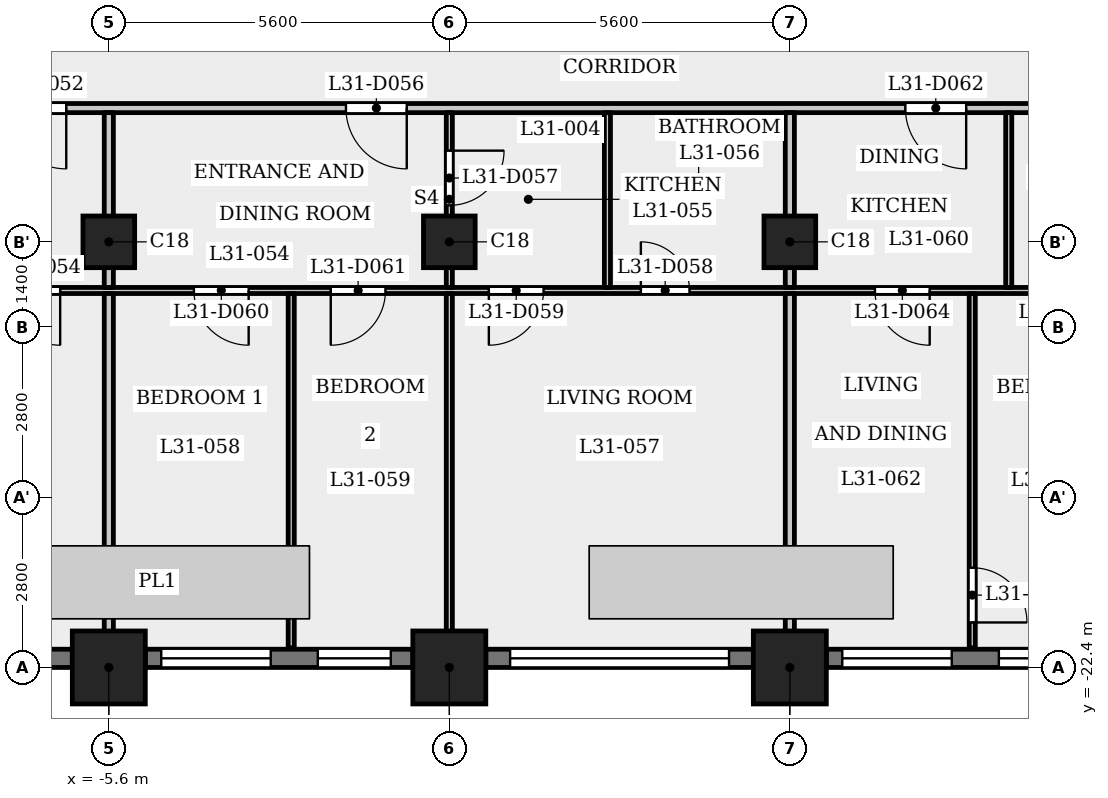
"""IFC4 building model, lengths in metres.
Left out: names, types, materials, properties, quantities, classifications, styles, units other than length and angle.
Written with IfcOpenShell. Run it as: python <this file> out.ifc"""

import sys

from ifc_helpers import new_model, si_unit, direction, frame, frame_2d, origin, origin_2d, place, context, subcontext, project, spatial, rectangle, extrude, element, fill, save


model = new_model("IFC4")
c1 = context("Model", 3, precision=1e-05, world=origin(), true_north=direction((0.0, 1.0)))
c2 = subcontext(c1, "Body", "Model", "MODEL_VIEW")
j1 = project(units=[si_unit("LENGTHUNIT", "METRE"), si_unit("PLANEANGLEUNIT", "RADIAN")], contexts=[c1])
p1 = place(None, origin())
s1 = spatial("IfcSite", under=j1, at=p1, CompositionType="ELEMENT")
p2 = place(p1, origin())
s2 = spatial("IfcBuilding", under=s1, at=p2, CompositionType="ELEMENT")
p3 = place(p2, frame((0.0, 0.0, 121.8)))
s3 = spatial("IfcBuildingStorey", under=s2, at=p3, CompositionType="ELEMENT", Elevation=121.8)
for number, where, z_axis, x_axis in (
    (1, (-5.6, -22.4, 0.0), (0.0, 0.0, 1.0), (1.0, 0.0, 0.0)),
    (2, (0.0, -22.4, 0.0), (0.0, 0.0, 1.0), (1.0, 0.0, 0.0)),
    (3, (5.6, -22.4, 0.0), (0.0, 0.0, 1.0), (1.0, 0.0, 0.0)),
):
    element("IfcColumn", number, at=place(p3, frame(where, z_axis=z_axis, x_axis=x_axis)), inside=s3, PredefinedType="COLUMN", context=c2, shape_type="SweptSolid", body=[
        extrude(rectangle(XDim=1.2, YDim=1.2, at=origin_2d()), origin(), (0.0, 0.0, 1.0), 3.5),
    ])
for number, where, z_axis, x_axis in (
    (4, (-5.6, -15.4, 0.0), (0.0, 0.0, 1.0), (1.0, 0.0, 0.0)),
    (5, (0.0, -15.4, 0.0), (0.0, 0.0, 1.0), (1.0, 0.0, 0.0)),
    (6, (5.6, -15.4, 0.0), (0.0, 0.0, 1.0), (1.0, 0.0, 0.0)),
):
    element("IfcColumn", number, at=place(p3, frame(where, z_axis=z_axis, x_axis=x_axis)), inside=s3, PredefinedType="COLUMN", context=c2, shape_type="SweptSolid", body=[
        extrude(rectangle(XDim=0.85, YDim=0.85, at=origin_2d()), origin(), (0.0, 0.0, 1.0), 3.5),
    ])
p4 = place(p3, frame((-10.6, -22.25, 0.0), z_axis=(0.0, 0.0, 1.0), x_axis=(1.0, 0.0, 0.0)))
e7 = element("IfcWall", 7, at=p4, inside=s3, PredefinedType="SOLIDWALL", context=c2, shape_type="SweptSolid", body=[
    extrude(rectangle(XDim=4.4, YDim=0.3, at=frame_2d((2.2, 0.0))), origin(), (0.0, 0.0, 1.0), 2.35),
])
p5 = place(p4, frame((0.4, 0.0, 1.2)))
e8 = element("IfcOpeningElement", 8, at=p5, cuts=e7, PredefinedType="OPENING", context=c2, shape_type="SweptSolid", body=[
    extrude(rectangle(XDim=3.6, YDim=0.95, at=frame_2d((1.8, 0.475))), frame((0.0, 0.16, 0.0), z_axis=(0.0, -1.0, 0.0), x_axis=(1.0, 0.0, 0.0)), (0.0, 0.0, 1.0), 0.32),
])
p6 = place(p3, frame((-5.0, -22.25, 0.0), z_axis=(0.0, 0.0, 1.0), x_axis=(1.0, 0.0, 0.0)))
e9 = element("IfcWall", 9, at=p6, inside=s3, PredefinedType="SOLIDWALL", context=c2, shape_type="SweptSolid", body=[
    extrude(rectangle(XDim=4.4, YDim=0.3, at=frame_2d((2.2, 0.0))), origin(), (0.0, 0.0, 1.0), 2.35),
])
p7 = place(p6, frame((0.262, 0.0, 0.9)))
e10 = element("IfcOpeningElement", 10, at=p7, cuts=e9, PredefinedType="OPENING", context=c2, shape_type="SweptSolid", body=[
    extrude(rectangle(XDim=1.8, YDim=1.25, at=frame_2d((0.9, 0.625))), frame((0.0, 0.16, 0.0), z_axis=(0.0, -1.0, 0.0), x_axis=(1.0, 0.0, 0.0)), (0.0, 0.0, 1.0), 0.32),
])
p8 = place(p6, frame((2.837, 0.0, 0.6)))
e11 = element("IfcOpeningElement", 11, at=p8, cuts=e9, PredefinedType="OPENING", context=c2, shape_type="SweptSolid", body=[
    extrude(rectangle(XDim=1.2, YDim=1.55, at=frame_2d((0.6, 0.775))), frame((0.0, 0.16, 0.0), z_axis=(0.0, -1.0, 0.0), x_axis=(1.0, 0.0, 0.0)), (0.0, 0.0, 1.0), 0.32),
])
p9 = place(p3, frame((0.6, -22.25, 0.0), z_axis=(0.0, 0.0, 1.0), x_axis=(1.0, 0.0, 0.0)))
e12 = element("IfcWall", 12, at=p9, inside=s3, PredefinedType="SOLIDWALL", context=c2, shape_type="SweptSolid", body=[
    extrude(rectangle(XDim=4.4, YDim=0.3, at=frame_2d((2.2, 0.0))), origin(), (0.0, 0.0, 1.0), 2.35),
])
p10 = place(p9, frame((0.4, 0.0, 1.2)))
e13 = element("IfcOpeningElement", 13, at=p10, cuts=e12, PredefinedType="OPENING", context=c2, shape_type="SweptSolid", body=[
    extrude(rectangle(XDim=3.6, YDim=0.95, at=frame_2d((1.8, 0.475))), frame((0.0, 0.16, 0.0), z_axis=(0.0, -1.0, 0.0), x_axis=(1.0, 0.0, 0.0)), (0.0, 0.0, 1.0), 0.32),
])
p11 = place(p3, frame((6.2, -22.25, 0.0), z_axis=(0.0, 0.0, 1.0), x_axis=(1.0, 0.0, 0.0)))
e14 = element("IfcWall", 14, at=p11, inside=s3, PredefinedType="SOLIDWALL", context=c2, shape_type="SweptSolid", body=[
    extrude(rectangle(XDim=4.4, YDim=0.3, at=frame_2d((2.2, 0.0))), origin(), (0.0, 0.0, 1.0), 2.35),
])
p12 = place(p11, frame((0.262, 0.0, 0.9)))
e15 = element("IfcOpeningElement", 15, at=p12, cuts=e14, PredefinedType="OPENING", context=c2, shape_type="SweptSolid", body=[
    extrude(rectangle(XDim=1.8, YDim=1.25, at=frame_2d((0.9, 0.625))), frame((0.0, 0.16, 0.0), z_axis=(0.0, -1.0, 0.0), x_axis=(1.0, 0.0, 0.0)), (0.0, 0.0, 1.0), 0.32),
])
p13 = place(p11, frame((2.837, 0.0, 0.6)))
e16 = element("IfcOpeningElement", 16, at=p13, cuts=e14, PredefinedType="OPENING", context=c2, shape_type="SweptSolid", body=[
    extrude(rectangle(XDim=1.2, YDim=1.55, at=frame_2d((0.6, 0.775))), frame((0.0, 0.16, 0.0), z_axis=(0.0, -1.0, 0.0), x_axis=(1.0, 0.0, 0.0)), (0.0, 0.0, 1.0), 0.32),
])
p14 = place(p3, frame((-16.725, -16.2, 0.0), z_axis=(0.0, 0.0, 1.0), x_axis=(1.0, 0.0, 0.0)))
e17 = element("IfcWall", 17, at=p14, inside=s3, PredefinedType="PARTITIONING", context=c2, shape_type="SweptSolid", body=[
    extrude(rectangle(XDim=33.45, YDim=0.1, at=frame_2d((16.725, 0.0))), origin(), (0.0, 0.0, 1.0), 3.15),
])
p15 = place(p14, frame((4.075, 0.0, 0.0)))
e18 = element("IfcOpeningElement", 18, at=p15, cuts=e17, PredefinedType="OPENING", context=c2, shape_type="SweptSolid", body=[
    extrude(rectangle(XDim=0.8, YDim=2.1, at=frame_2d((0.4, 1.05))), frame((0.0, 0.06, 0.0), z_axis=(0.0, -1.0, 0.0), x_axis=(1.0, 0.0, 0.0)), (0.0, 0.0, 1.0), 0.12),
])
p16 = place(p14, frame((9.425, 0.0, 0.0)))
e19 = element("IfcOpeningElement", 19, at=p16, cuts=e17, PredefinedType="OPENING", context=c2, shape_type="SweptSolid", body=[
    extrude(rectangle(XDim=0.9, YDim=2.1, at=frame_2d((0.45, 1.05))), frame((0.0, 0.06, 0.0), z_axis=(0.0, -1.0, 0.0), x_axis=(1.0, 0.0, 0.0)), (0.0, 0.0, 1.0), 0.12),
])
p17 = place(p14, frame((19.875, 0.0, 0.0)))
e20 = element("IfcOpeningElement", 20, at=p17, cuts=e17, PredefinedType="OPENING", context=c2, shape_type="SweptSolid", body=[
    extrude(rectangle(XDim=0.8, YDim=2.1, at=frame_2d((0.4, 1.05))), frame((0.0, 0.06, 0.0), z_axis=(0.0, -1.0, 0.0), x_axis=(1.0, 0.0, 0.0)), (0.0, 0.0, 1.0), 0.12),
])
p18 = place(p14, frame((17.375, 0.0, 0.0)))
e21 = element("IfcOpeningElement", 21, at=p18, cuts=e17, PredefinedType="OPENING", context=c2, shape_type="SweptSolid", body=[
    extrude(rectangle(XDim=0.9, YDim=2.1, at=frame_2d((0.45, 1.05))), frame((0.0, 0.06, 0.0), z_axis=(0.0, -1.0, 0.0), x_axis=(1.0, 0.0, 0.0)), (0.0, 0.0, 1.0), 0.12),
])
p19 = place(p14, frame((12.525, 0.0, 0.0)))
e22 = element("IfcOpeningElement", 22, at=p19, cuts=e17, PredefinedType="OPENING", context=c2, shape_type="SweptSolid", body=[
    extrude(rectangle(XDim=0.9, YDim=2.1, at=frame_2d((0.45, 1.05))), frame((0.0, 0.06, 0.0), z_axis=(0.0, -1.0, 0.0), x_axis=(1.0, 0.0, 0.0)), (0.0, 0.0, 1.0), 0.12),
])
p20 = place(p14, frame((14.775, 0.0, 0.0)))
e23 = element("IfcOpeningElement", 23, at=p20, cuts=e17, PredefinedType="OPENING", context=c2, shape_type="SweptSolid", body=[
    extrude(rectangle(XDim=0.9, YDim=2.1, at=frame_2d((0.45, 1.05))), frame((0.0, 0.06, 0.0), z_axis=(0.0, -1.0, 0.0), x_axis=(1.0, 0.0, 0.0)), (0.0, 0.0, 1.0), 0.12),
])
p21 = place(p14, frame((26.475, 0.0, 0.0)))
e24 = element("IfcOpeningElement", 24, at=p21, cuts=e17, PredefinedType="OPENING", context=c2, shape_type="SweptSolid", body=[
    extrude(rectangle(XDim=0.8, YDim=2.1, at=frame_2d((0.4, 1.05))), frame((0.0, 0.06, 0.0), z_axis=(0.0, -1.0, 0.0), x_axis=(1.0, 0.0, 0.0)), (0.0, 0.0, 1.0), 0.12),
])
p22 = place(p14, frame((23.725, 0.0, 0.0)))
e25 = element("IfcOpeningElement", 25, at=p22, cuts=e17, PredefinedType="OPENING", context=c2, shape_type="SweptSolid", body=[
    extrude(rectangle(XDim=0.9, YDim=2.1, at=frame_2d((0.45, 1.05))), frame((0.0, 0.06, 0.0), z_axis=(0.0, -1.0, 0.0), x_axis=(1.0, 0.0, 0.0)), (0.0, 0.0, 1.0), 0.12),
])
p23 = place(p14, frame((29.075, 0.0, 0.0)))
e26 = element("IfcOpeningElement", 26, at=p23, cuts=e17, PredefinedType="OPENING", context=c2, shape_type="SweptSolid", body=[
    extrude(rectangle(XDim=0.8, YDim=2.1, at=frame_2d((0.4, 1.05))), frame((0.0, 0.06, 0.0), z_axis=(0.0, -1.0, 0.0), x_axis=(1.0, 0.0, 0.0)), (0.0, 0.0, 1.0), 0.12),
])
p24 = place(p14, frame((30.675, 0.0, 0.0)))
e27 = element("IfcOpeningElement", 27, at=p24, cuts=e17, PredefinedType="OPENING", context=c2, shape_type="SweptSolid", body=[
    extrude(rectangle(XDim=0.9, YDim=2.1, at=frame_2d((0.45, 1.05))), frame((0.0, 0.06, 0.0), z_axis=(0.0, -1.0, 0.0), x_axis=(1.0, 0.0, 0.0)), (0.0, 0.0, 1.0), 0.12),
])
p25 = place(p3, frame((-17.4, -13.2, 0.0), z_axis=(0.0, 0.0, 1.0), x_axis=(1.0, 0.0, 0.0)))
e28 = element("IfcWall", 28, at=p25, inside=s3, PredefinedType="PARTITIONING", context=c2, shape_type="SweptSolid", body=[
    extrude(rectangle(XDim=34.8, YDim=0.15, at=frame_2d((17.4, 0.0))), origin(), (0.0, 0.0, 1.0), 3.15),
])
p26 = place(p25, frame((0.15, 0.0, 0.0)))
e29 = element("IfcOpeningElement", 29, at=p26, cuts=e28, PredefinedType="OPENING", context=c2, shape_type="SweptSolid", body=[
    extrude(rectangle(XDim=1.0, YDim=2.1, at=frame_2d((0.5, 1.05))), frame((0.0, 0.085, 0.0), z_axis=(0.0, -1.0, 0.0), x_axis=(1.0, 0.0, 0.0)), (0.0, 0.0, 1.0), 0.17),
])
p27 = place(p25, frame((33.55, 0.0, 0.0)))
e30 = element("IfcOpeningElement", 30, at=p27, cuts=e28, PredefinedType="OPENING", context=c2, shape_type="SweptSolid", body=[
    extrude(rectangle(XDim=1.0, YDim=2.1, at=frame_2d((0.5, 1.05))), frame((0.0, 0.085, 0.0), z_axis=(0.0, -1.0, 0.0), x_axis=(1.0, 0.0, 0.0)), (0.0, 0.0, 1.0), 0.17),
])
p28 = place(p25, frame((10.1, 0.0, 0.0)))
e31 = element("IfcOpeningElement", 31, at=p28, cuts=e28, PredefinedType="OPENING", context=c2, shape_type="SweptSolid", body=[
    extrude(rectangle(XDim=1.0, YDim=2.1, at=frame_2d((0.5, 1.05))), frame((0.0, 0.085, 0.0), z_axis=(0.0, -1.0, 0.0), x_axis=(1.0, 0.0, 0.0)), (0.0, 0.0, 1.0), 0.17),
])
p29 = place(p25, frame((15.7, 0.0, 0.0)))
e32 = element("IfcOpeningElement", 32, at=p29, cuts=e28, PredefinedType="OPENING", context=c2, shape_type="SweptSolid", body=[
    extrude(rectangle(XDim=1.0, YDim=2.1, at=frame_2d((0.5, 1.05))), frame((0.0, 0.085, 0.0), z_axis=(0.0, -1.0, 0.0), x_axis=(1.0, 0.0, 0.0)), (0.0, 0.0, 1.0), 0.17),
])
p30 = place(p25, frame((24.9, 0.0, 0.0)))
e33 = element("IfcOpeningElement", 33, at=p30, cuts=e28, PredefinedType="OPENING", context=c2, shape_type="SweptSolid", body=[
    extrude(rectangle(XDim=1.0, YDim=2.1, at=frame_2d((0.5, 1.05))), frame((0.0, 0.085, 0.0), z_axis=(0.0, -1.0, 0.0), x_axis=(1.0, 0.0, 0.0)), (0.0, 0.0, 1.0), 0.17),
])
p31 = place(p3, frame((-5.6, -22.98, 0.0), z_axis=(0.0, 0.0, 1.0), x_axis=(0.0, 1.0, 0.0)))
e34 = element("IfcWall", 34, at=p31, inside=s3, PredefinedType="PARTITIONING", context=c2, shape_type="SweptSolid", body=[
    extrude(rectangle(XDim=6.73, YDim=0.15, at=frame_2d((3.365, 0.0))), origin(), (0.0, 0.0, 1.0), 3.15),
])
p32 = place(p3, frame((-5.6, -16.15, 0.0), z_axis=(0.0, 0.0, 1.0), x_axis=(0.0, 1.0, 0.0)))
e35 = element("IfcWall", 35, at=p32, inside=s3, PredefinedType="PARTITIONING", context=c2, shape_type="SweptSolid", body=[
    extrude(rectangle(XDim=2.875, YDim=0.15, at=frame_2d((1.438, 0.0))), origin(), (0.0, 0.0, 1.0), 3.15),
])
p33 = place(p3, frame((-2.6, -22.08, 0.0), z_axis=(0.0, 0.0, 1.0), x_axis=(0.0, 1.0, 0.0)))
e36 = element("IfcWall", 36, at=p33, inside=s3, PredefinedType="PARTITIONING", context=c2, shape_type="SweptSolid", body=[
    extrude(rectangle(XDim=5.83, YDim=0.1, at=frame_2d((2.915, 0.0))), origin(), (0.0, 0.0, 1.0), 3.15),
])
p34 = place(p3, frame((0.0, -22.98, 0.0), z_axis=(0.0, 0.0, 1.0), x_axis=(0.0, 1.0, 0.0)))
e37 = element("IfcWall", 37, at=p34, inside=s3, PredefinedType="PARTITIONING", context=c2, shape_type="SweptSolid", body=[
    extrude(rectangle(XDim=6.73, YDim=0.1, at=frame_2d((3.365, 0.0))), origin(), (0.0, 0.0, 1.0), 3.15),
])
p35 = place(p3, frame((0.0, -16.15, 0.0), z_axis=(0.0, 0.0, 1.0), x_axis=(0.0, 1.0, 0.0)))
e38 = element("IfcWall", 38, at=p35, inside=s3, PredefinedType="PARTITIONING", context=c2, shape_type="SweptSolid", body=[
    extrude(rectangle(XDim=2.875, YDim=0.1, at=frame_2d((1.438, 0.0))), origin(), (0.0, 0.0, 1.0), 3.15),
])
p36 = place(p35, frame((1.35, 0.0, 0.0)))
e39 = element("IfcOpeningElement", 39, at=p36, cuts=e38, PredefinedType="OPENING", context=c2, shape_type="SweptSolid", body=[
    extrude(rectangle(XDim=0.9, YDim=2.1, at=frame_2d((0.45, 1.05))), frame((0.0, 0.06, 0.0), z_axis=(0.0, -1.0, 0.0), x_axis=(1.0, 0.0, 0.0)), (0.0, 0.0, 1.0), 0.12),
])
p37 = place(p3, frame((2.6, -16.15, 0.0), z_axis=(0.0, 0.0, 1.0), x_axis=(0.0, 1.0, 0.0)))
e40 = element("IfcWall", 40, at=p37, inside=s3, PredefinedType="PARTITIONING", context=c2, shape_type="SweptSolid", body=[
    extrude(rectangle(XDim=2.875, YDim=0.1, at=frame_2d((1.438, 0.0))), origin(), (0.0, 0.0, 1.0), 3.15),
])
p38 = place(p3, frame((5.6, -22.98, 0.0), z_axis=(0.0, 0.0, 1.0), x_axis=(0.0, 1.0, 0.0)))
e41 = element("IfcWall", 41, at=p38, inside=s3, PredefinedType="PARTITIONING", context=c2, shape_type="SweptSolid", body=[
    extrude(rectangle(XDim=6.73, YDim=0.15, at=frame_2d((3.365, 0.0))), origin(), (0.0, 0.0, 1.0), 3.15),
])
p39 = place(p3, frame((5.6, -16.15, 0.0), z_axis=(0.0, 0.0, 1.0), x_axis=(0.0, 1.0, 0.0)))
e42 = element("IfcWall", 42, at=p39, inside=s3, PredefinedType="PARTITIONING", context=c2, shape_type="SweptSolid", body=[
    extrude(rectangle(XDim=2.875, YDim=0.15, at=frame_2d((1.438, 0.0))), origin(), (0.0, 0.0, 1.0), 3.15),
])
p40 = place(p3, frame((8.6, -22.08, 0.0), z_axis=(0.0, 0.0, 1.0), x_axis=(0.0, 1.0, 0.0)))
e43 = element("IfcWall", 43, at=p40, inside=s3, PredefinedType="PARTITIONING", context=c2, shape_type="SweptSolid", body=[
    extrude(rectangle(XDim=5.83, YDim=0.1, at=frame_2d((2.915, 0.0))), origin(), (0.0, 0.0, 1.0), 3.15),
])
p41 = place(p40, frame((0.42, 0.0, 0.0)))
e44 = element("IfcOpeningElement", 44, at=p41, cuts=e43, PredefinedType="OPENING", context=c2, shape_type="SweptSolid", body=[
    extrude(rectangle(XDim=0.9, YDim=2.1, at=frame_2d((0.45, 1.05))), frame((0.0, 0.06, 0.0), z_axis=(0.0, -1.0, 0.0), x_axis=(1.0, 0.0, 0.0)), (0.0, 0.0, 1.0), 0.12),
])
p42 = place(p3, frame((9.2, -16.15, 0.0), z_axis=(0.0, 0.0, 1.0), x_axis=(0.0, 1.0, 0.0)))
e45 = element("IfcWall", 45, at=p42, inside=s3, PredefinedType="PARTITIONING", context=c2, shape_type="SweptSolid", body=[
    extrude(rectangle(XDim=2.875, YDim=0.1, at=frame_2d((1.438, 0.0))), origin(), (0.0, 0.0, 1.0), 3.15),
])
p43 = place(p28, origin())
e46 = element("IfcDoor", 46, at=p43, inside=s3, OperationType="SINGLE_SWING_RIGHT", PredefinedType="DOOR", context=c2, shape_type="SweptSolid", body=[
    extrude(rectangle(XDim=1.0, YDim=2.1, at=frame_2d((0.5, 1.05))), frame((0.0, 0.025, 0.0), z_axis=(0.0, -1.0, 0.0), x_axis=(1.0, 0.0, 0.0)), (0.0, 0.0, 1.0), 0.05),
])
fill(e31, e46)
p44 = place(p16, origin())
e47 = element("IfcDoor", 47, at=p44, inside=s3, OperationType="SINGLE_SWING_RIGHT", PredefinedType="DOOR", context=c2, shape_type="SweptSolid", body=[
    extrude(rectangle(XDim=0.9, YDim=2.1, at=frame_2d((0.45, 1.05))), frame((0.0, 0.025, 0.0), z_axis=(0.0, -1.0, 0.0), x_axis=(1.0, 0.0, 0.0)), (0.0, 0.0, 1.0), 0.05),
])
fill(e19, e47)
p45 = place(p29, origin())
e48 = element("IfcDoor", 48, at=p45, inside=s3, OperationType="SINGLE_SWING_RIGHT", PredefinedType="DOOR", context=c2, shape_type="SweptSolid", body=[
    extrude(rectangle(XDim=1.0, YDim=2.1, at=frame_2d((0.5, 1.05))), frame((0.0, 0.025, 0.0), z_axis=(0.0, -1.0, 0.0), x_axis=(1.0, 0.0, 0.0)), (0.0, 0.0, 1.0), 0.05),
])
fill(e32, e48)
p46 = place(p36, origin())
e49 = element("IfcDoor", 49, at=p46, inside=s3, OperationType="SINGLE_SWING_RIGHT", PredefinedType="DOOR", context=c2, shape_type="SweptSolid", body=[
    extrude(rectangle(XDim=0.9, YDim=2.1, at=frame_2d((0.45, 1.05))), frame((0.0, 0.025, 0.0), z_axis=(0.0, -1.0, 0.0), x_axis=(1.0, 0.0, 0.0)), (0.0, 0.0, 1.0), 0.05),
])
fill(e39, e49)
p47 = place(p17, origin())
e50 = element("IfcDoor", 50, at=p47, inside=s3, OperationType="SINGLE_SWING_RIGHT", PredefinedType="DOOR", context=c2, shape_type="SweptSolid", body=[
    extrude(rectangle(XDim=0.8, YDim=2.1, at=frame_2d((0.4, 1.05))), frame((0.0, 0.025, 0.0), z_axis=(0.0, -1.0, 0.0), x_axis=(1.0, 0.0, 0.0)), (0.0, 0.0, 1.0), 0.05),
])
fill(e20, e50)
p48 = place(p18, origin())
e51 = element("IfcDoor", 51, at=p48, inside=s3, OperationType="SINGLE_SWING_LEFT", PredefinedType="DOOR", context=c2, shape_type="SweptSolid", body=[
    extrude(rectangle(XDim=0.9, YDim=2.1, at=frame_2d((0.45, 1.05))), frame((0.0, 0.025, 0.0), z_axis=(0.0, -1.0, 0.0), x_axis=(1.0, 0.0, 0.0)), (0.0, 0.0, 1.0), 0.05),
])
fill(e21, e51)
p49 = place(p19, origin())
e52 = element("IfcDoor", 52, at=p49, inside=s3, OperationType="SINGLE_SWING_RIGHT", PredefinedType="DOOR", context=c2, shape_type="SweptSolid", body=[
    extrude(rectangle(XDim=0.9, YDim=2.1, at=frame_2d((0.45, 1.05))), frame((0.0, 0.025, 0.0), z_axis=(0.0, -1.0, 0.0), x_axis=(1.0, 0.0, 0.0)), (0.0, 0.0, 1.0), 0.05),
])
fill(e22, e52)
p50 = place(p20, origin())
e53 = element("IfcDoor", 53, at=p50, inside=s3, OperationType="SINGLE_SWING_LEFT", PredefinedType="DOOR", context=c2, shape_type="SweptSolid", body=[
    extrude(rectangle(XDim=0.9, YDim=2.1, at=frame_2d((0.45, 1.05))), frame((0.0, 0.025, 0.0), z_axis=(0.0, -1.0, 0.0), x_axis=(1.0, 0.0, 0.0)), (0.0, 0.0, 1.0), 0.05),
])
fill(e23, e53)
p51 = place(p30, origin())
e54 = element("IfcDoor", 54, at=p51, inside=s3, OperationType="SINGLE_SWING_RIGHT", PredefinedType="DOOR", context=c2, shape_type="SweptSolid", body=[
    extrude(rectangle(XDim=1.0, YDim=2.1, at=frame_2d((0.5, 1.05))), frame((0.0, 0.025, 0.0), z_axis=(0.0, -1.0, 0.0), x_axis=(1.0, 0.0, 0.0)), (0.0, 0.0, 1.0), 0.05),
])
fill(e33, e54)
p52 = place(p22, origin())
e55 = element("IfcDoor", 55, at=p52, inside=s3, OperationType="SINGLE_SWING_RIGHT", PredefinedType="DOOR", context=c2, shape_type="SweptSolid", body=[
    extrude(rectangle(XDim=0.9, YDim=2.1, at=frame_2d((0.45, 1.05))), frame((0.0, 0.025, 0.0), z_axis=(0.0, -1.0, 0.0), x_axis=(1.0, 0.0, 0.0)), (0.0, 0.0, 1.0), 0.05),
])
fill(e25, e55)
p53 = place(p41, origin())
e56 = element("IfcDoor", 56, at=p53, inside=s3, OperationType="SINGLE_SWING_LEFT", PredefinedType="DOOR", context=c2, shape_type="SweptSolid", body=[
    extrude(rectangle(XDim=0.9, YDim=2.1, at=frame_2d((0.45, 1.05))), frame((0.0, 0.025, 0.0), z_axis=(0.0, -1.0, 0.0), x_axis=(1.0, 0.0, 0.0)), (0.0, 0.0, 1.0), 0.05),
])
fill(e44, e56)
p54 = place(p7, origin())
e57 = element("IfcWindow", 57, at=p54, inside=s3, PartitioningType="SINGLE_PANEL", PredefinedType="WINDOW", context=c2, shape_type="SweptSolid", body=[
    extrude(rectangle(XDim=1.8, YDim=1.25, at=frame_2d((0.9, 0.625))), frame((0.0, 0.03, 0.0), z_axis=(0.0, -1.0, 0.0), x_axis=(1.0, 0.0, 0.0)), (0.0, 0.0, 1.0), 0.06),
])
fill(e10, e57)
p55 = place(p8, origin())
e58 = element("IfcWindow", 58, at=p55, inside=s3, PartitioningType="SINGLE_PANEL", PredefinedType="WINDOW", context=c2, shape_type="SweptSolid", body=[
    extrude(rectangle(XDim=1.2, YDim=1.55, at=frame_2d((0.6, 0.775))), frame((0.0, 0.03, 0.0), z_axis=(0.0, -1.0, 0.0), x_axis=(1.0, 0.0, 0.0)), (0.0, 0.0, 1.0), 0.06),
])
fill(e11, e58)
p56 = place(p10, origin())
e59 = element("IfcWindow", 59, at=p56, inside=s3, PartitioningType="SINGLE_PANEL", PredefinedType="WINDOW", context=c2, shape_type="SweptSolid", body=[
    extrude(rectangle(XDim=3.6, YDim=0.95, at=frame_2d((1.8, 0.475))), frame((0.0, 0.03, 0.0), z_axis=(0.0, -1.0, 0.0), x_axis=(1.0, 0.0, 0.0)), (0.0, 0.0, 1.0), 0.06),
])
fill(e13, e59)
p57 = place(p12, origin())
e60 = element("IfcWindow", 60, at=p57, inside=s3, PartitioningType="SINGLE_PANEL", PredefinedType="WINDOW", context=c2, shape_type="SweptSolid", body=[
    extrude(rectangle(XDim=1.8, YDim=1.25, at=frame_2d((0.9, 0.625))), frame((0.0, 0.03, 0.0), z_axis=(0.0, -1.0, 0.0), x_axis=(1.0, 0.0, 0.0)), (0.0, 0.0, 1.0), 0.06),
])
fill(e15, e60)
p58 = place(p13, origin())
e61 = element("IfcWindow", 61, at=p58, inside=s3, PartitioningType="SINGLE_PANEL", PredefinedType="WINDOW", context=c2, shape_type="SweptSolid", body=[
    extrude(rectangle(XDim=1.2, YDim=1.55, at=frame_2d((0.6, 0.775))), frame((0.0, 0.03, 0.0), z_axis=(0.0, -1.0, 0.0), x_axis=(1.0, 0.0, 0.0)), (0.0, 0.0, 1.0), 0.06),
])
fill(e16, e61)
save(model, sys.argv[1])
